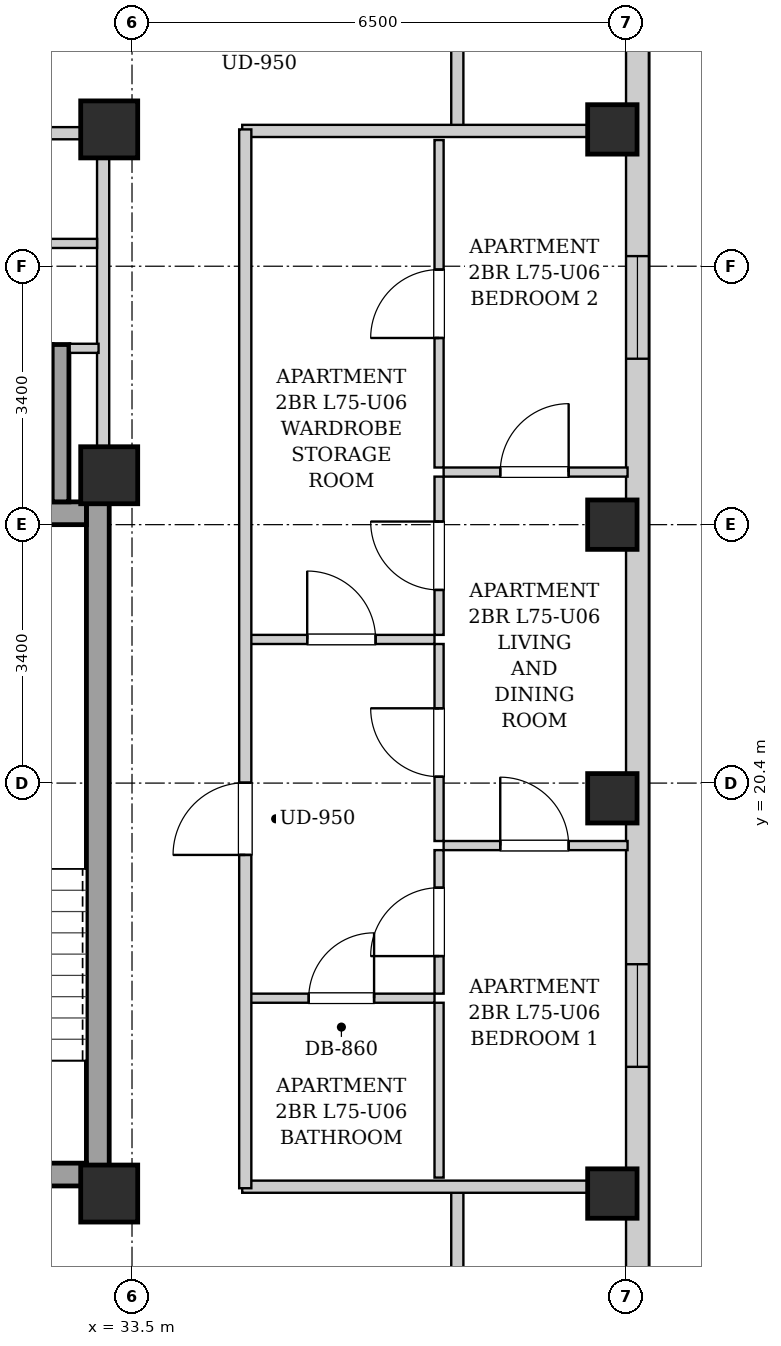
"""IFC4 building model, lengths in metres.
Left out: names, types, materials, properties, quantities, classifications, styles, units other than length and angle.
Written with IfcOpenShell. Run it as: python <this file> out.ifc"""

import sys

from ifc_helpers import new_model, si_unit, direction, frame, frame_2d, origin, origin_2d, place, context, subcontext, project, spatial, rectangle, extrude, element, fill, save


model = new_model("IFC4")
c1 = context("Model", 3, precision=1e-05, world=origin(), true_north=direction((0.0, 1.0)))
c2 = subcontext(c1, "Body", "Model", "MODEL_VIEW")
j1 = project(units=[si_unit("LENGTHUNIT", "METRE"), si_unit("PLANEANGLEUNIT", "RADIAN")], contexts=[c1])
p1 = place(None, origin())
s1 = spatial("IfcSite", under=j1, at=p1, CompositionType="ELEMENT")
p2 = place(p1, origin())
s2 = spatial("IfcBuilding", under=s1, at=p2, CompositionType="ELEMENT")
p3 = place(p2, frame((0.0, 0.0, 258.1)))
s3 = spatial("IfcBuildingStorey", under=s2, at=p3, CompositionType="ELEMENT", Elevation=258.1)
for number, where, z_axis, x_axis in (
    (1, (39.82, 15.0, 0.0), (0.0, 0.0, 1.0), (1.0, 0.0, 0.0)),
    (2, (39.82, 20.2, 0.0), (0.0, 0.0, 1.0), (1.0, 0.0, 0.0)),
    (3, (39.82, 23.8, 0.0), (0.0, 0.0, 1.0), (1.0, 0.0, 0.0)),
    (4, (39.82, 29.0, 0.0), (0.0, 0.0, 1.0), (1.0, 0.0, 0.0)),
):
    element("IfcColumn", number, at=place(p3, frame(where, z_axis=z_axis, x_axis=x_axis)), inside=s3, PredefinedType="COLUMN", context=c2, shape_type="SweptSolid", body=[
        extrude(rectangle(XDim=0.65, YDim=0.65, at=origin_2d()), origin(), (0.0, 0.0, 1.0), 3.4),
    ])
for number, where, z_axis, x_axis in (
    (5, (33.2, 15.0, 0.0), (0.0, 0.0, 1.0), (1.0, 0.0, 0.0)),
    (6, (33.2, 29.0, 0.0), (0.0, 0.0, 1.0), (1.0, 0.0, 0.0)),
    (7, (33.2, 24.45, 0.0), (0.0, 0.0, 1.0), (1.0, 0.0, 0.0)),
):
    element("IfcColumn", number, at=place(p3, frame(where, z_axis=z_axis, x_axis=x_axis)), inside=s3, PredefinedType="COLUMN", context=c2, shape_type="SweptSolid", body=[
        extrude(rectangle(XDim=0.75, YDim=0.75, at=origin_2d()), origin(), (0.0, 0.0, 1.0), 3.4),
    ])
p4 = place(p3, frame((40.15, 37.7, 0.0), z_axis=(0.0, 0.0, 1.0), x_axis=(0.0, -1.0, 0.0)))
e8 = element("IfcWall", 8, at=p4, inside=s3, PredefinedType="SOLIDWALL", context=c2, shape_type="SweptSolid", body=[
    extrude(rectangle(XDim=31.4, YDim=0.3, at=frame_2d((15.7, 0.0))), origin(), (0.0, 0.0, 1.0), 3.05),
])
p5 = place(p4, frame((28.396, 0.0, 0.55)))
e9 = element("IfcOpeningElement", 9, at=p5, cuts=e8, PredefinedType="OPENING", context=c2, shape_type="SweptSolid", body=[
    extrude(rectangle(XDim=1.35, YDim=1.2, at=frame_2d((0.675, 0.6))), frame((0.0, 0.16, 0.0), z_axis=(0.0, -1.0, 0.0), x_axis=(1.0, 0.0, 0.0)), (0.0, 0.0, 1.0), 0.32),
])
p6 = place(p4, frame((1.653, 0.0, 0.55)))
e10 = element("IfcOpeningElement", 10, at=p6, cuts=e8, PredefinedType="OPENING", context=c2, shape_type="SweptSolid", body=[
    extrude(rectangle(XDim=1.35, YDim=1.2, at=frame_2d((0.675, 0.6))), frame((0.0, 0.16, 0.0), z_axis=(0.0, -1.0, 0.0), x_axis=(1.0, 0.0, 0.0)), (0.0, 0.0, 1.0), 0.32),
])
p7 = place(p4, frame((19.683, 0.0, 0.55)))
e11 = element("IfcOpeningElement", 11, at=p7, cuts=e8, PredefinedType="OPENING", context=c2, shape_type="SweptSolid", body=[
    extrude(rectangle(XDim=1.35, YDim=1.2, at=frame_2d((0.675, 0.6))), frame((0.0, 0.16, 0.0), z_axis=(0.0, -1.0, 0.0), x_axis=(1.0, 0.0, 0.0)), (0.0, 0.0, 1.0), 0.32),
])
p8 = place(p4, frame((10.367, 0.0, 0.55)))
e12 = element("IfcOpeningElement", 12, at=p8, cuts=e8, PredefinedType="OPENING", context=c2, shape_type="SweptSolid", body=[
    extrude(rectangle(XDim=1.35, YDim=1.2, at=frame_2d((0.675, 0.6))), frame((0.0, 0.16, 0.0), z_axis=(0.0, -1.0, 0.0), x_axis=(1.0, 0.0, 0.0)), (0.0, 0.0, 1.0), 0.32),
])
p9 = place(p3, frame((33.05, 15.1, 0.0), z_axis=(0.0, 0.0, 1.0), x_axis=(0.0, 1.0, 0.0)))
e13 = element("IfcWall", 13, at=p9, inside=s3, PredefinedType="SHEAR", context=c2, shape_type="SweptSolid", body=[
    extrude(rectangle(XDim=9.0, YDim=0.3, at=frame_2d((4.5, 0.0))), origin(), (0.0, 0.0, 1.0), 3.05),
])
p10 = place(p3, frame((30.05, 23.95, 0.0), z_axis=(0.0, 0.0, 1.0), x_axis=(1.0, 0.0, 0.0)))
e14 = element("IfcWall", 14, at=p10, inside=s3, PredefinedType="SHEAR", context=c2, shape_type="SweptSolid", body=[
    extrude(rectangle(XDim=2.85, YDim=0.3, at=frame_2d((1.425, 0.0))), origin(), (0.0, 0.0, 1.0), 3.05),
])
p11 = place(p3, frame((30.05, 15.25, 0.0), z_axis=(0.0, 0.0, 1.0), x_axis=(1.0, 0.0, 0.0)))
e15 = element("IfcWall", 15, at=p11, inside=s3, PredefinedType="SHEAR", context=c2, shape_type="SweptSolid", body=[
    extrude(rectangle(XDim=2.85, YDim=0.3, at=frame_2d((1.425, 0.0))), origin(), (0.0, 0.0, 1.0), 3.05),
])
p12 = place(p11, frame((0.86, 0.0, 0.0)))
e16 = element("IfcOpeningElement", 16, at=p12, cuts=e15, PredefinedType="OPENING", context=c2, shape_type="SweptSolid", body=[
    extrude(rectangle(XDim=1.1, YDim=2.05, at=frame_2d((0.55, 1.025))), frame((0.0, 0.16, 0.0), z_axis=(0.0, -1.0, 0.0), x_axis=(1.0, 0.0, 0.0)), (0.0, 0.0, 1.0), 0.32),
])
p13 = place(p3, frame((32.56, 24.1, 0.0), z_axis=(0.0, 0.0, 1.0), x_axis=(0.0, 1.0, 0.0)))
e17 = element("IfcWall", 17, at=p13, inside=s3, PredefinedType="SHEAR", context=c2, shape_type="SweptSolid", body=[
    extrude(rectangle(XDim=2.07, YDim=0.22, at=frame_2d((1.035, 0.0))), origin(), (0.0, 0.0, 1.0), 3.05),
])
p14 = place(p3, frame((33.12, 24.12, 0.0), z_axis=(0.0, 0.0, 1.0), x_axis=(0.0, 1.0, 0.0)))
e18 = element("IfcWall", 18, at=p14, inside=s3, PredefinedType="PARTITIONING", context=c2, shape_type="SweptSolid", body=[
    extrude(rectangle(XDim=4.76, YDim=0.16, at=frame_2d((2.38, 0.0))), origin(), (0.0, 0.0, 1.0), 2.385),
])
p15 = place(p3, frame((32.68, 26.12, 0.0), z_axis=(0.0, 0.0, 1.0), x_axis=(1.0, 0.0, 0.0)))
e19 = element("IfcWall", 19, at=p15, inside=s3, PredefinedType="PARTITIONING", context=c2, shape_type="SweptSolid", body=[
    extrude(rectangle(XDim=0.38, YDim=0.12, at=frame_2d((0.19, 0.0))), origin(), (0.0, 0.0, 1.0), 3.05),
])
p16 = place(p3, frame((30.12, 27.5, 0.0), z_axis=(0.0, 0.0, 1.0), x_axis=(1.0, 0.0, 0.0)))
e20 = element("IfcWall", 20, at=p16, inside=s3, PredefinedType="PARTITIONING", context=c2, shape_type="SweptSolid", body=[
    extrude(rectangle(XDim=2.92, YDim=0.12, at=frame_2d((1.46, 0.0))), origin(), (0.0, 0.0, 1.0), 3.05),
])
p17 = place(p16, frame((0.97, 0.0, 0.0)))
e21 = element("IfcOpeningElement", 21, at=p17, cuts=e20, PredefinedType="OPENING", context=c2, shape_type="SweptSolid", body=[
    extrude(rectangle(XDim=0.86, YDim=2.05, at=frame_2d((0.43, 1.025))), frame((0.0, 0.07, 0.0), z_axis=(0.0, -1.0, 0.0), x_axis=(1.0, 0.0, 0.0)), (0.0, 0.0, 1.0), 0.14),
])
p18 = place(p3, frame((25.72, 28.95, 0.0), z_axis=(0.0, 0.0, 1.0), x_axis=(1.0, 0.0, 0.0)))
e22 = element("IfcWall", 22, at=p18, inside=s3, PredefinedType="PARTITIONING", context=c2, shape_type="SweptSolid", body=[
    extrude(rectangle(XDim=7.32, YDim=0.16, at=frame_2d((3.66, 0.0))), origin(), (0.0, 0.0, 1.0), 2.578),
])
p19 = place(p18, frame((1.27, 0.0, 0.0)))
e23 = element("IfcOpeningElement", 23, at=p19, cuts=e22, PredefinedType="OPENING", context=c2, shape_type="SweptSolid", body=[
    extrude(rectangle(XDim=0.86, YDim=2.05, at=frame_2d((0.43, 1.025))), frame((0.0, 0.09, 0.0), z_axis=(0.0, -1.0, 0.0), x_axis=(1.0, 0.0, 0.0)), (0.0, 0.0, 1.0), 0.18),
])
for number, where, z_axis, x_axis in (
    (24, (37.78, 13.51, 0.0), (0.0, 0.0, 1.0), (0.0, 1.0, 0.0)),
    (25, (37.78, 28.98, 0.0), (0.0, 0.0, 1.0), (0.0, 1.0, 0.0)),
):
    element("IfcWall", number, at=place(p3, frame(where, z_axis=z_axis, x_axis=x_axis)), inside=s3, PredefinedType="PARTITIONING", context=c2, shape_type="SweptSolid", body=[
        extrude(rectangle(XDim=1.58, YDim=0.16, at=frame_2d((0.79, 0.0))), origin(), (0.0, 0.0, 1.0), 3.05),
    ])
for number, where, z_axis, x_axis in (
    (26, (34.95, 15.09, 0.0), (0.0, 0.0, 1.0), (1.0, 0.0, 0.0)),
    (27, (34.95, 28.98, 0.0), (0.0, 0.0, 1.0), (1.0, 0.0, 0.0)),
):
    element("IfcWall", number, at=place(p3, frame(where, z_axis=z_axis, x_axis=x_axis)), inside=s3, PredefinedType="PARTITIONING", context=c2, shape_type="SweptSolid", body=[
        extrude(rectangle(XDim=5.07, YDim=0.16, at=frame_2d((2.535, 0.0))), origin(), (0.0, 0.0, 1.0), 2.578),
    ])
p20 = place(p3, frame((35.03, 22.29, 0.0), z_axis=(0.0, 0.0, 1.0), x_axis=(1.0, 0.0, 0.0)))
e28 = element("IfcWall", 28, at=p20, inside=s3, PredefinedType="PARTITIONING", context=c2, shape_type="SweptSolid", body=[
    extrude(rectangle(XDim=2.45, YDim=0.12, at=frame_2d((1.225, 0.0))), origin(), (0.0, 0.0, 1.0), 3.05),
])
p21 = place(p20, frame((0.775, 0.0, 0.0)))
e29 = element("IfcOpeningElement", 29, at=p21, cuts=e28, PredefinedType="OPENING", context=c2, shape_type="SweptSolid", body=[
    extrude(rectangle(XDim=0.9, YDim=2.05, at=frame_2d((0.45, 1.025))), frame((0.0, 0.07, 0.0), z_axis=(0.0, -1.0, 0.0), x_axis=(1.0, 0.0, 0.0)), (0.0, 0.0, 1.0), 0.14),
])
p22 = place(p3, frame((37.54, 22.35, 0.0), z_axis=(0.0, 0.0, 1.0), x_axis=(0.0, 1.0, 0.0)))
e30 = element("IfcWall", 30, at=p22, inside=s3, PredefinedType="PARTITIONING", context=c2, shape_type="SweptSolid", body=[
    extrude(rectangle(XDim=2.082, YDim=0.12, at=frame_2d((1.041, 0.0))), origin(), (0.0, 0.0, 1.0), 3.05),
])
p23 = place(p22, frame((0.591, 0.0, 0.0)))
e31 = element("IfcOpeningElement", 31, at=p23, cuts=e30, PredefinedType="OPENING", context=c2, shape_type="SweptSolid", body=[
    extrude(rectangle(XDim=0.9, YDim=2.05, at=frame_2d((0.45, 1.025))), frame((0.0, 0.07, 0.0), z_axis=(0.0, -1.0, 0.0), x_axis=(1.0, 0.0, 0.0)), (0.0, 0.0, 1.0), 0.14),
])
p24 = place(p3, frame((37.54, 24.552, 0.0), z_axis=(0.0, 0.0, 1.0), x_axis=(0.0, 1.0, 0.0)))
e32 = element("IfcWall", 32, at=p24, inside=s3, PredefinedType="PARTITIONING", context=c2, shape_type="SweptSolid", body=[
    extrude(rectangle(XDim=4.308, YDim=0.12, at=frame_2d((2.154, 0.0))), origin(), (0.0, 0.0, 1.0), 3.05),
])
p25 = place(p24, frame((1.704, 0.0, 0.0)))
e33 = element("IfcOpeningElement", 33, at=p25, cuts=e32, PredefinedType="OPENING", context=c2, shape_type="SweptSolid", body=[
    extrude(rectangle(XDim=0.9, YDim=2.05, at=frame_2d((0.45, 1.025))), frame((0.0, 0.07, 0.0), z_axis=(0.0, -1.0, 0.0), x_axis=(1.0, 0.0, 0.0)), (0.0, 0.0, 1.0), 0.14),
])
p26 = place(p3, frame((35.03, 17.57, 0.0), z_axis=(0.0, 0.0, 1.0), x_axis=(1.0, 0.0, 0.0)))
e34 = element("IfcWall", 34, at=p26, inside=s3, PredefinedType="PARTITIONING", context=c2, shape_type="SweptSolid", body=[
    extrude(rectangle(XDim=2.45, YDim=0.12, at=frame_2d((1.225, 0.0))), origin(), (0.0, 0.0, 1.0), 3.05),
])
p27 = place(p26, frame((0.795, 0.0, 0.0)))
e35 = element("IfcOpeningElement", 35, at=p27, cuts=e34, PredefinedType="OPENING", context=c2, shape_type="SweptSolid", body=[
    extrude(rectangle(XDim=0.86, YDim=2.05, at=frame_2d((0.43, 1.025))), frame((0.0, 0.07, 0.0), z_axis=(0.0, -1.0, 0.0), x_axis=(1.0, 0.0, 0.0)), (0.0, 0.0, 1.0), 0.14),
])
p28 = place(p3, frame((37.54, 15.21, 0.0), z_axis=(0.0, 0.0, 1.0), x_axis=(0.0, 1.0, 0.0)))
e36 = element("IfcWall", 36, at=p28, inside=s3, PredefinedType="PARTITIONING", context=c2, shape_type="SweptSolid", body=[
    extrude(rectangle(XDim=2.3, YDim=0.12, at=frame_2d((1.15, 0.0))), origin(), (0.0, 0.0, 1.0), 3.05),
])
p29 = place(p3, frame((37.54, 17.63, 0.0), z_axis=(0.0, 0.0, 1.0), x_axis=(0.0, 1.0, 0.0)))
e37 = element("IfcWall", 37, at=p29, inside=s3, PredefinedType="PARTITIONING", context=c2, shape_type="SweptSolid", body=[
    extrude(rectangle(XDim=1.888, YDim=0.12, at=frame_2d((0.944, 0.0))), origin(), (0.0, 0.0, 1.0), 3.05),
])
p30 = place(p29, frame((0.494, 0.0, 0.0)))
e38 = element("IfcOpeningElement", 38, at=p30, cuts=e37, PredefinedType="OPENING", context=c2, shape_type="SweptSolid", body=[
    extrude(rectangle(XDim=0.9, YDim=2.05, at=frame_2d((0.45, 1.025))), frame((0.0, 0.07, 0.0), z_axis=(0.0, -1.0, 0.0), x_axis=(1.0, 0.0, 0.0)), (0.0, 0.0, 1.0), 0.14),
])
p31 = place(p3, frame((37.54, 19.638, 0.0), z_axis=(0.0, 0.0, 1.0), x_axis=(0.0, 1.0, 0.0)))
e39 = element("IfcWall", 39, at=p31, inside=s3, PredefinedType="PARTITIONING", context=c2, shape_type="SweptSolid", body=[
    extrude(rectangle(XDim=2.592, YDim=0.12, at=frame_2d((1.296, 0.0))), origin(), (0.0, 0.0, 1.0), 3.05),
])
p32 = place(p31, frame((0.846, 0.0, 0.0)))
e40 = element("IfcOpeningElement", 40, at=p32, cuts=e39, PredefinedType="OPENING", context=c2, shape_type="SweptSolid", body=[
    extrude(rectangle(XDim=0.9, YDim=2.05, at=frame_2d((0.45, 1.025))), frame((0.0, 0.07, 0.0), z_axis=(0.0, -1.0, 0.0), x_axis=(1.0, 0.0, 0.0)), (0.0, 0.0, 1.0), 0.14),
])
p33 = place(p3, frame((37.6, 19.578, 0.0), z_axis=(0.0, 0.0, 1.0), x_axis=(1.0, 0.0, 0.0)))
e41 = element("IfcWall", 41, at=p33, inside=s3, PredefinedType="PARTITIONING", context=c2, shape_type="SweptSolid", body=[
    extrude(rectangle(XDim=2.42, YDim=0.12, at=frame_2d((1.21, 0.0))), origin(), (0.0, 0.0, 1.0), 3.05),
])
p34 = place(p33, frame((0.745, 0.0, 0.0)))
e42 = element("IfcOpeningElement", 42, at=p34, cuts=e41, PredefinedType="OPENING", context=c2, shape_type="SweptSolid", body=[
    extrude(rectangle(XDim=0.9, YDim=2.05, at=frame_2d((0.45, 1.025))), frame((0.0, 0.07, 0.0), z_axis=(0.0, -1.0, 0.0), x_axis=(1.0, 0.0, 0.0)), (0.0, 0.0, 1.0), 0.14),
])
p35 = place(p3, frame((37.6, 24.492, 0.0), z_axis=(0.0, 0.0, 1.0), x_axis=(1.0, 0.0, 0.0)))
e43 = element("IfcWall", 43, at=p35, inside=s3, PredefinedType="PARTITIONING", context=c2, shape_type="SweptSolid", body=[
    extrude(rectangle(XDim=2.42, YDim=0.12, at=frame_2d((1.21, 0.0))), origin(), (0.0, 0.0, 1.0), 2.788),
])
p36 = place(p35, frame((0.745, 0.0, 0.0)))
e44 = element("IfcOpeningElement", 44, at=p36, cuts=e43, PredefinedType="OPENING", context=c2, shape_type="SweptSolid", body=[
    extrude(rectangle(XDim=0.9, YDim=2.05, at=frame_2d((0.45, 1.025))), frame((0.0, 0.07, 0.0), z_axis=(0.0, -1.0, 0.0), x_axis=(1.0, 0.0, 0.0)), (0.0, 0.0, 1.0), 0.14),
])
p37 = place(p3, frame((34.99, 15.07, 0.0), z_axis=(0.0, 0.0, 1.0), x_axis=(0.0, 1.0, 0.0)))
e45 = element("IfcWall", 45, at=p37, inside=s3, PredefinedType="PARTITIONING", context=c2, shape_type="SweptSolid", body=[
    extrude(rectangle(XDim=13.93, YDim=0.16, at=frame_2d((6.965, 0.0))), origin(), (0.0, 0.0, 1.0), 3.05),
])
p38 = place(p37, frame((4.385, 0.0, 0.0)))
e46 = element("IfcOpeningElement", 46, at=p38, cuts=e45, PredefinedType="OPENING", context=c2, shape_type="SweptSolid", body=[
    extrude(rectangle(XDim=0.95, YDim=2.1, at=frame_2d((0.475, 1.05))), frame((0.0, 0.09, 0.0), z_axis=(0.0, -1.0, 0.0), x_axis=(1.0, 0.0, 0.0)), (0.0, 0.0, 1.0), 0.18),
])
p39 = place(p21, origin())
e47 = element("IfcDoor", 47, at=p39, inside=s3, OperationType="SINGLE_SWING_LEFT", PredefinedType="DOOR", context=c2, shape_type="SweptSolid", body=[
    extrude(rectangle(XDim=0.9, YDim=2.05, at=frame_2d((0.45, 1.025))), frame((0.0, 0.025, 0.0), z_axis=(0.0, -1.0, 0.0), x_axis=(1.0, 0.0, 0.0)), (0.0, 0.0, 1.0), 0.05),
])
fill(e29, e47)
p40 = place(p23, origin())
e48 = element("IfcDoor", 48, at=p40, inside=s3, OperationType="SINGLE_SWING_RIGHT", PredefinedType="DOOR", context=c2, shape_type="SweptSolid", body=[
    extrude(rectangle(XDim=0.9, YDim=2.05, at=frame_2d((0.45, 1.025))), frame((0.0, 0.025, 0.0), z_axis=(0.0, -1.0, 0.0), x_axis=(1.0, 0.0, 0.0)), (0.0, 0.0, 1.0), 0.05),
])
fill(e31, e48)
p41 = place(p25, origin())
e49 = element("IfcDoor", 49, at=p41, inside=s3, OperationType="SINGLE_SWING_LEFT", PredefinedType="DOOR", context=c2, shape_type="SweptSolid", body=[
    extrude(rectangle(XDim=0.9, YDim=2.05, at=frame_2d((0.45, 1.025))), frame((0.0, 0.025, 0.0), z_axis=(0.0, -1.0, 0.0), x_axis=(1.0, 0.0, 0.0)), (0.0, 0.0, 1.0), 0.05),
])
fill(e33, e49)
p42 = place(p27, origin())
e50 = element("IfcDoor", 50, at=p42, inside=s3, OperationType="SINGLE_SWING_RIGHT", PredefinedType="DOOR", context=c2, shape_type="SweptSolid", body=[
    extrude(rectangle(XDim=0.86, YDim=2.05, at=frame_2d((0.43, 1.025))), frame((0.0, 0.025, 0.0), z_axis=(0.0, -1.0, 0.0), x_axis=(1.0, 0.0, 0.0)), (0.0, 0.0, 1.0), 0.05),
])
fill(e35, e50)
p43 = place(p30, origin())
e51 = element("IfcDoor", 51, at=p43, inside=s3, OperationType="SINGLE_SWING_LEFT", PredefinedType="DOOR", context=c2, shape_type="SweptSolid", body=[
    extrude(rectangle(XDim=0.9, YDim=2.05, at=frame_2d((0.45, 1.025))), frame((0.0, 0.025, 0.0), z_axis=(0.0, -1.0, 0.0), x_axis=(1.0, 0.0, 0.0)), (0.0, 0.0, 1.0), 0.05),
])
fill(e38, e51)
p44 = place(p32, origin())
e52 = element("IfcDoor", 52, at=p44, inside=s3, OperationType="SINGLE_SWING_RIGHT", PredefinedType="DOOR", context=c2, shape_type="SweptSolid", body=[
    extrude(rectangle(XDim=0.9, YDim=2.05, at=frame_2d((0.45, 1.025))), frame((0.0, 0.025, 0.0), z_axis=(0.0, -1.0, 0.0), x_axis=(1.0, 0.0, 0.0)), (0.0, 0.0, 1.0), 0.05),
])
fill(e40, e52)
p45 = place(p34, origin())
e53 = element("IfcDoor", 53, at=p45, inside=s3, OperationType="SINGLE_SWING_LEFT", PredefinedType="DOOR", context=c2, shape_type="SweptSolid", body=[
    extrude(rectangle(XDim=0.9, YDim=2.05, at=frame_2d((0.45, 1.025))), frame((0.0, 0.025, 0.0), z_axis=(0.0, -1.0, 0.0), x_axis=(1.0, 0.0, 0.0)), (0.0, 0.0, 1.0), 0.05),
])
fill(e42, e53)
p46 = place(p36, origin())
e54 = element("IfcDoor", 54, at=p46, inside=s3, OperationType="SINGLE_SWING_RIGHT", PredefinedType="DOOR", context=c2, shape_type="SweptSolid", body=[
    extrude(rectangle(XDim=0.9, YDim=2.05, at=frame_2d((0.45, 1.025))), frame((0.0, 0.025, 0.0), z_axis=(0.0, -1.0, 0.0), x_axis=(1.0, 0.0, 0.0)), (0.0, 0.0, 1.0), 0.05),
])
fill(e44, e54)
p47 = place(p38, origin())
e55 = element("IfcDoor", 55, at=p47, inside=s3, OperationType="SINGLE_SWING_LEFT", PredefinedType="DOOR", context=c2, shape_type="SweptSolid", body=[
    extrude(rectangle(XDim=0.95, YDim=2.1, at=frame_2d((0.475, 1.05))), frame((0.0, 0.025, 0.0), z_axis=(0.0, -1.0, 0.0), x_axis=(1.0, 0.0, 0.0)), (0.0, 0.0, 1.0), 0.05),
])
fill(e46, e55)
p48 = place(p7, origin())
e56 = element("IfcWindow", 56, at=p48, inside=s3, PartitioningType="SINGLE_PANEL", PredefinedType="WINDOW", context=c2, shape_type="SweptSolid", body=[
    extrude(rectangle(XDim=1.35, YDim=1.2, at=frame_2d((0.675, 0.6))), frame((0.0, 0.03, 0.0), z_axis=(0.0, -1.0, 0.0), x_axis=(1.0, 0.0, 0.0)), (0.0, 0.0, 1.0), 0.06),
])
fill(e11, e56)
p49 = place(p8, origin())
e57 = element("IfcWindow", 57, at=p49, inside=s3, PartitioningType="SINGLE_PANEL", PredefinedType="WINDOW", context=c2, shape_type="SweptSolid", body=[
    extrude(rectangle(XDim=1.35, YDim=1.2, at=frame_2d((0.675, 0.6))), frame((0.0, 0.03, 0.0), z_axis=(0.0, -1.0, 0.0), x_axis=(1.0, 0.0, 0.0)), (0.0, 0.0, 1.0), 0.06),
])
fill(e12, e57)
save(model, sys.argv[1])
